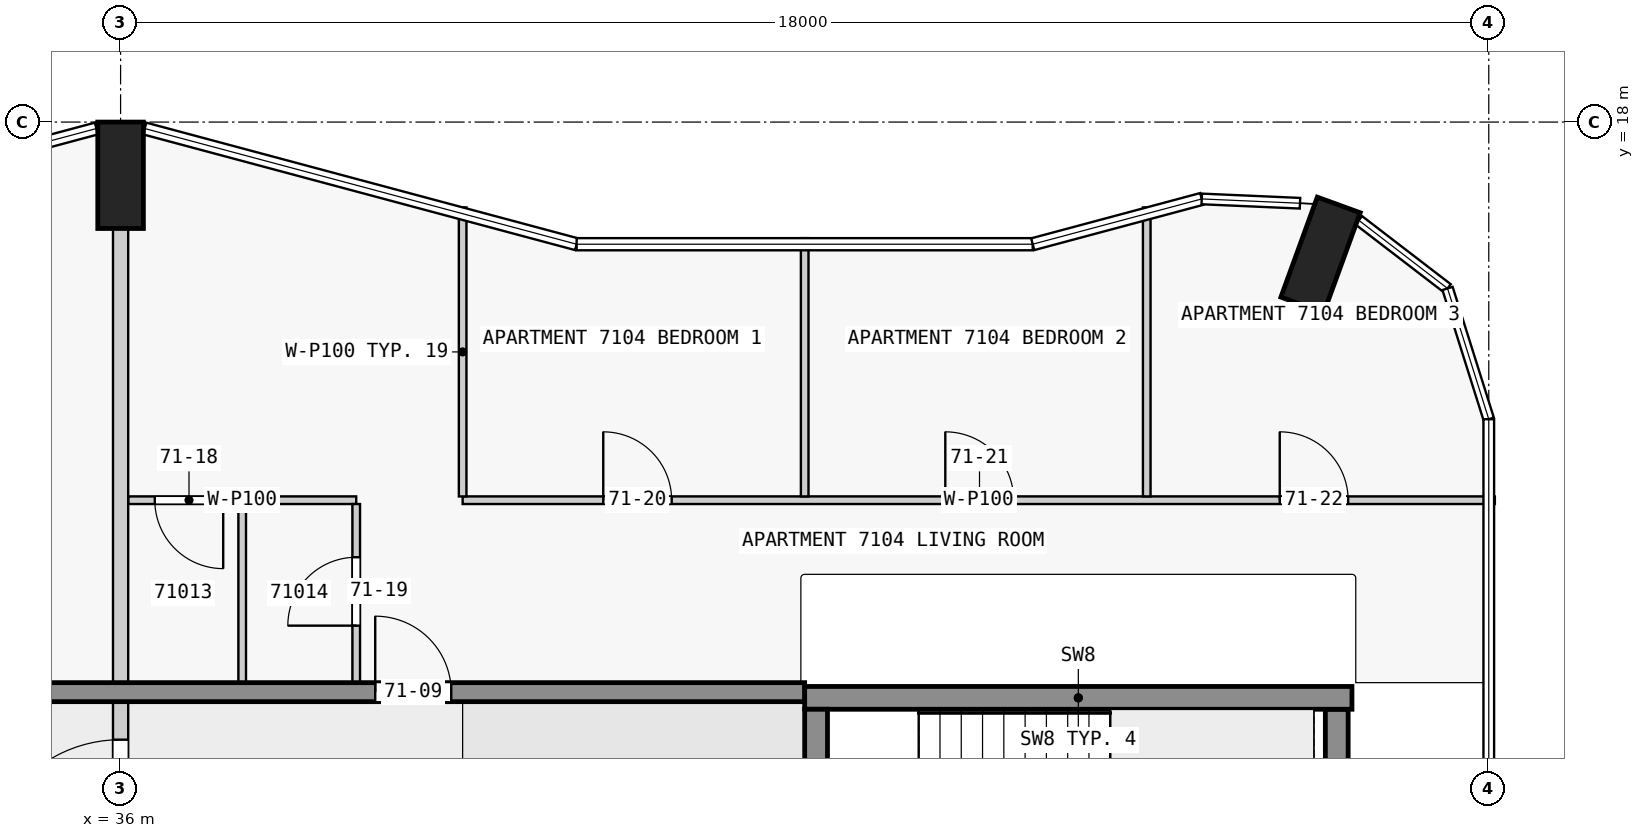
"""IFC4 building model, lengths in metres.
Left out: names, types, materials, properties, quantities, classifications, styles, units other than length and angle.
Written with IfcOpenShell. Run it as: python <this file> out.ifc"""

import sys

from ifc_helpers import new_model, si_unit, direction, frame, frame_2d, origin, origin_2d, place, context, subcontext, project, spatial, rectangle, extrude, element, fill, save


model = new_model("IFC4")
c1 = context("Model", 3, precision=1e-05, world=origin(), true_north=direction((0.0, 1.0)))
c2 = subcontext(c1, "Body", "Model", "MODEL_VIEW")
j1 = project(units=[si_unit("LENGTHUNIT", "METRE"), si_unit("PLANEANGLEUNIT", "RADIAN")], contexts=[c1])
p1 = place(None, origin())
s1 = spatial("IfcSite", under=j1, at=p1, CompositionType="ELEMENT")
p2 = place(p1, origin())
s2 = spatial("IfcBuilding", under=s1, at=p2, CompositionType="ELEMENT")
p3 = place(p2, frame((0.0, 0.0, 270.4)))
s3 = spatial("IfcBuildingStorey", under=s2, at=p3, CompositionType="ELEMENT", Elevation=270.4)
for number, where, z_axis, x_axis in (
    (1, (51.787, 16.252, 0.0), (0.0, 0.0, 1.0), (-0.94, 0.342, 0.0)),
    (2, (36.0, 17.3, 0.0), (0.0, 0.0, 1.0), (1.0, 0.0, 0.0)),
):
    element("IfcColumn", number, at=place(p3, frame(where, z_axis=z_axis, x_axis=x_axis)), inside=s3, PredefinedType="COLUMN", context=c2, shape_type="SweptSolid", body=[
        extrude(rectangle(XDim=0.6, YDim=1.4, at=origin_2d()), origin(), (0.0, 0.0, 1.0), 3.5),
    ])
p4 = place(p3, frame((45.15, 7.725, 0.0), z_axis=(0.0, 0.0, 1.0), x_axis=(0.0, 1.0, 0.0)))
e3 = element("IfcWall", 3, at=p4, inside=s3, PredefinedType="SHEAR", context=c2, shape_type="SweptSolid", body=[
    extrude(rectangle(XDim=2.55, YDim=0.3, at=frame_2d((1.275, 0.0))), origin(), (0.0, 0.0, 1.0), 3.5),
])
p5 = place(p4, frame((0.725, 0.0, 0.0)))
e4 = element("IfcOpeningElement", 4, at=p5, cuts=e3, PredefinedType="OPENING", context=c2, shape_type="SweptSolid", body=[
    extrude(rectangle(XDim=1.1, YDim=2.1, at=frame_2d((0.55, 1.05))), frame((0.0, 0.16, 0.0), z_axis=(0.0, -1.0, 0.0), x_axis=(1.0, 0.0, 0.0)), (0.0, 0.0, 1.0), 0.32),
])
p6 = place(p3, frame((52.0, 7.725, 0.0), z_axis=(0.0, 0.0, 1.0), x_axis=(0.0, 1.0, 0.0)))
e5 = element("IfcWall", 5, at=p6, inside=s3, PredefinedType="SHEAR", context=c2, shape_type="SweptSolid", body=[
    extrude(rectangle(XDim=2.55, YDim=0.3, at=frame_2d((1.275, 0.0))), origin(), (0.0, 0.0, 1.0), 3.5),
])
p7 = place(p3, frame((45.0, 10.425, 0.0), z_axis=(0.0, 0.0, 1.0), x_axis=(1.0, 0.0, 0.0)))
e6 = element("IfcWall", 6, at=p7, inside=s3, PredefinedType="SHEAR", context=c2, shape_type="SweptSolid", body=[
    extrude(rectangle(XDim=7.2, YDim=0.3, at=frame_2d((3.6, 0.0))), origin(), (0.0, 0.0, 1.0), 3.5),
])
p8 = place(p3, frame((22.5, 10.5, 0.0), z_axis=(0.0, 0.0, 1.0), x_axis=(1.0, 0.0, 0.0)))
e7 = element("IfcWall", 7, at=p8, inside=s3, PredefinedType="SHEAR", context=c2, shape_type="SweptSolid", body=[
    extrude(rectangle(XDim=22.5, YDim=0.25, at=frame_2d((11.25, 0.0))), origin(), (0.0, 0.0, 1.0), 3.25),
])
p9 = place(p8, frame((1.75, 0.0, 0.0)))
e8 = element("IfcOpeningElement", 8, at=p9, cuts=e7, PredefinedType="OPENING", context=c2, shape_type="SweptSolid", body=[
    extrude(rectangle(XDim=1.0, YDim=2.1, at=frame_2d((0.5, 1.05))), frame((0.0, 0.135, 0.0), z_axis=(0.0, -1.0, 0.0), x_axis=(1.0, 0.0, 0.0)), (0.0, 0.0, 1.0), 0.27),
])
p10 = place(p8, frame((8.55, 0.0, 0.0)))
e9 = element("IfcOpeningElement", 9, at=p10, cuts=e7, PredefinedType="OPENING", context=c2, shape_type="SweptSolid", body=[
    extrude(rectangle(XDim=1.0, YDim=2.1, at=frame_2d((0.5, 1.05))), frame((0.0, 0.135, 0.0), z_axis=(0.0, -1.0, 0.0), x_axis=(1.0, 0.0, 0.0)), (0.0, 0.0, 1.0), 0.27),
])
p11 = place(p8, frame((16.85, 0.0, 0.0)))
e10 = element("IfcOpeningElement", 10, at=p11, cuts=e7, PredefinedType="OPENING", context=c2, shape_type="SweptSolid", body=[
    extrude(rectangle(XDim=1.0, YDim=2.1, at=frame_2d((0.5, 1.05))), frame((0.0, 0.135, 0.0), z_axis=(0.0, -1.0, 0.0), x_axis=(1.0, 0.0, 0.0)), (0.0, 0.0, 1.0), 0.27),
])
p12 = place(p3, frame((39.1, 13.025, 0.0), z_axis=(0.0, 0.0, 1.0), x_axis=(-1.0, 0.0, 0.0)))
e11 = element("IfcWall", 11, at=p12, inside=s3, PredefinedType="PARTITIONING", context=c2, shape_type="SweptSolid", body=[
    extrude(rectangle(XDim=3.0, YDim=0.1, at=frame_2d((1.5, 0.0))), origin(), (0.0, 0.0, 1.0), 3.25),
])
p13 = place(p12, frame((1.75, 0.0, 0.0)))
e12 = element("IfcOpeningElement", 12, at=p13, cuts=e11, PredefinedType="OPENING", context=c2, shape_type="SweptSolid", body=[
    extrude(rectangle(XDim=0.9, YDim=2.1, at=frame_2d((0.45, 1.05))), frame((0.0, 0.06, 0.0), z_axis=(0.0, -1.0, 0.0), x_axis=(1.0, 0.0, 0.0)), (0.0, 0.0, 1.0), 0.12),
])
p14 = place(p3, frame((40.5, 13.025, 0.0), z_axis=(0.0, 0.0, 1.0), x_axis=(1.0, 0.0, 0.0)))
e13 = element("IfcWall", 13, at=p14, inside=s3, PredefinedType="PARTITIONING", context=c2, shape_type="SweptSolid", body=[
    extrude(rectangle(XDim=13.58, YDim=0.1, at=frame_2d((6.79, 0.0))), origin(), (0.0, 0.0, 1.0), 3.25),
])
p15 = place(p14, frame((1.85, 0.0, 0.0)))
e14 = element("IfcOpeningElement", 14, at=p15, cuts=e13, PredefinedType="OPENING", context=c2, shape_type="SweptSolid", body=[
    extrude(rectangle(XDim=0.9, YDim=2.1, at=frame_2d((0.45, 1.05))), frame((0.0, 0.06, 0.0), z_axis=(0.0, -1.0, 0.0), x_axis=(1.0, 0.0, 0.0)), (0.0, 0.0, 1.0), 0.12),
])
p16 = place(p14, frame((6.35, 0.0, 0.0)))
e15 = element("IfcOpeningElement", 15, at=p16, cuts=e13, PredefinedType="OPENING", context=c2, shape_type="SweptSolid", body=[
    extrude(rectangle(XDim=0.9, YDim=2.1, at=frame_2d((0.45, 1.05))), frame((0.0, 0.06, 0.0), z_axis=(0.0, -1.0, 0.0), x_axis=(1.0, 0.0, 0.0)), (0.0, 0.0, 1.0), 0.12),
])
p17 = place(p14, frame((10.75, 0.0, 0.0)))
e16 = element("IfcOpeningElement", 16, at=p17, cuts=e13, PredefinedType="OPENING", context=c2, shape_type="SweptSolid", body=[
    extrude(rectangle(XDim=0.9, YDim=2.1, at=frame_2d((0.45, 1.05))), frame((0.0, 0.06, 0.0), z_axis=(0.0, -1.0, 0.0), x_axis=(1.0, 0.0, 0.0)), (0.0, 0.0, 1.0), 0.12),
])
p18 = place(p3, frame((36.0, 10.625, 0.0), z_axis=(0.0, 0.0, 1.0), x_axis=(0.0, 1.0, 0.0)))
e17 = element("IfcWall", 17, at=p18, inside=s3, PredefinedType="PARTITIONING", context=c2, shape_type="SweptSolid", body=[
    extrude(rectangle(XDim=5.975, YDim=0.2, at=frame_2d((2.988, 0.0))), origin(), (0.0, 0.0, 1.0), 3.25),
])
p19 = place(p3, frame((37.6, 10.625, 0.0), z_axis=(0.0, 0.0, 1.0), x_axis=(0.0, 1.0, 0.0)))
e18 = element("IfcWall", 18, at=p19, inside=s3, PredefinedType="PARTITIONING", context=c2, shape_type="SweptSolid", body=[
    extrude(rectangle(XDim=2.35, YDim=0.1, at=frame_2d((1.175, 0.0))), origin(), (0.0, 0.0, 1.0), 3.25),
])
p20 = place(p3, frame((39.1, 10.625, 0.0), z_axis=(0.0, 0.0, 1.0), x_axis=(0.0, 1.0, 0.0)))
e19 = element("IfcWall", 19, at=p20, inside=s3, PredefinedType="PARTITIONING", context=c2, shape_type="SweptSolid", body=[
    extrude(rectangle(XDim=2.35, YDim=0.1, at=frame_2d((1.175, 0.0))), origin(), (0.0, 0.0, 1.0), 3.25),
])
p21 = place(p20, frame((0.75, 0.0, 0.0)))
e20 = element("IfcOpeningElement", 20, at=p21, cuts=e19, PredefinedType="OPENING", context=c2, shape_type="SweptSolid", body=[
    extrude(rectangle(XDim=0.9, YDim=2.1, at=frame_2d((0.45, 1.05))), frame((0.0, 0.06, 0.0), z_axis=(0.0, -1.0, 0.0), x_axis=(1.0, 0.0, 0.0)), (0.0, 0.0, 1.0), 0.12),
])
p22 = place(p3, frame((40.5, 16.878, 0.0), z_axis=(0.0, 0.0, 1.0), x_axis=(0.0, -1.0, 0.0)))
e21 = element("IfcWall", 21, at=p22, inside=s3, PredefinedType="PARTITIONING", context=c2, shape_type="SweptSolid", body=[
    extrude(rectangle(XDim=3.803, YDim=0.1, at=frame_2d((1.901, 0.0))), origin(), (0.0, 0.0, 1.0), 3.25),
])
p23 = place(p3, frame((45.0, 13.075, 0.0), z_axis=(0.0, 0.0, 1.0), x_axis=(0.0, 1.0, 0.0)))
e22 = element("IfcWall", 22, at=p23, inside=s3, PredefinedType="PARTITIONING", context=c2, shape_type="SweptSolid", body=[
    extrude(rectangle(XDim=3.398, YDim=0.1, at=frame_2d((1.699, 0.0))), origin(), (0.0, 0.0, 1.0), 3.25),
])
p24 = place(p3, frame((49.5, 13.075, 0.0), z_axis=(0.0, 0.0, 1.0), x_axis=(0.0, 1.0, 0.0)))
e23 = element("IfcWall", 23, at=p24, inside=s3, PredefinedType="PARTITIONING", context=c2, shape_type="SweptSolid", body=[
    extrude(rectangle(XDim=3.803, YDim=0.1, at=frame_2d((1.901, 0.0))), origin(), (0.0, 0.0, 1.0), 3.25),
])
p25 = place(p3, frame((36.0, 7.475, 0.0), z_axis=(0.0, 0.0, 1.0), x_axis=(0.0, 1.0, 0.0)))
e24 = element("IfcWall", 24, at=p25, inside=s3, PredefinedType="PARTITIONING", context=c2, shape_type="SweptSolid", body=[
    extrude(rectangle(XDim=3.05, YDim=0.2, at=frame_2d((1.525, 0.0))), origin(), (0.0, 0.0, 1.0), 3.25),
])
p26 = place(p25, frame((0.6, 0.0, 0.0)))
e25 = element("IfcOpeningElement", 25, at=p26, cuts=e24, PredefinedType="OPENING", context=c2, shape_type="SweptSolid", body=[
    extrude(rectangle(XDim=1.8, YDim=2.1, at=frame_2d((0.9, 1.05))), frame((0.0, 0.11, 0.0), z_axis=(0.0, -1.0, 0.0), x_axis=(1.0, 0.0, 0.0)), (0.0, 0.0, 1.0), 0.22),
])
p27 = place(p11, origin())
e26 = element("IfcDoor", 26, at=p27, inside=s3, OperationType="SINGLE_SWING_RIGHT", PredefinedType="DOOR", context=c2, shape_type="SweptSolid", body=[
    extrude(rectangle(XDim=1.0, YDim=2.1, at=frame_2d((0.5, 1.05))), frame((0.0, 0.025, 0.0), z_axis=(0.0, -1.0, 0.0), x_axis=(1.0, 0.0, 0.0)), (0.0, 0.0, 1.0), 0.05),
])
fill(e10, e26)
p28 = place(p26, origin())
e27 = element("IfcDoor", 27, at=p28, inside=s3, OperationType="SINGLE_SWING_LEFT", PredefinedType="DOOR", context=c2, shape_type="SweptSolid", body=[
    extrude(rectangle(XDim=1.8, YDim=2.1, at=frame_2d((0.9, 1.05))), frame((0.0, 0.025, 0.0), z_axis=(0.0, -1.0, 0.0), x_axis=(1.0, 0.0, 0.0)), (0.0, 0.0, 1.0), 0.05),
])
fill(e25, e27)
p29 = place(p13, origin())
e28 = element("IfcDoor", 28, at=p29, inside=s3, OperationType="SINGLE_SWING_RIGHT", PredefinedType="DOOR", context=c2, shape_type="SweptSolid", body=[
    extrude(rectangle(XDim=0.9, YDim=2.1, at=frame_2d((0.45, 1.05))), frame((0.0, 0.025, 0.0), z_axis=(0.0, -1.0, 0.0), x_axis=(1.0, 0.0, 0.0)), (0.0, 0.0, 1.0), 0.05),
])
fill(e12, e28)
p30 = place(p21, origin())
e29 = element("IfcDoor", 29, at=p30, inside=s3, OperationType="SINGLE_SWING_RIGHT", PredefinedType="DOOR", context=c2, shape_type="SweptSolid", body=[
    extrude(rectangle(XDim=0.9, YDim=2.1, at=frame_2d((0.45, 1.05))), frame((0.0, 0.025, 0.0), z_axis=(0.0, -1.0, 0.0), x_axis=(1.0, 0.0, 0.0)), (0.0, 0.0, 1.0), 0.05),
])
fill(e20, e29)
p31 = place(p15, origin())
e30 = element("IfcDoor", 30, at=p31, inside=s3, OperationType="SINGLE_SWING_LEFT", PredefinedType="DOOR", context=c2, shape_type="SweptSolid", body=[
    extrude(rectangle(XDim=0.9, YDim=2.1, at=frame_2d((0.45, 1.05))), frame((0.0, 0.025, 0.0), z_axis=(0.0, -1.0, 0.0), x_axis=(1.0, 0.0, 0.0)), (0.0, 0.0, 1.0), 0.05),
])
fill(e14, e30)
p32 = place(p16, origin())
e31 = element("IfcDoor", 31, at=p32, inside=s3, OperationType="SINGLE_SWING_RIGHT", PredefinedType="DOOR", context=c2, shape_type="SweptSolid", body=[
    extrude(rectangle(XDim=0.9, YDim=2.1, at=frame_2d((0.45, 1.05))), frame((0.0, 0.025, 0.0), z_axis=(0.0, -1.0, 0.0), x_axis=(1.0, 0.0, 0.0)), (0.0, 0.0, 1.0), 0.05),
])
fill(e15, e31)
p33 = place(p17, origin())
e32 = element("IfcDoor", 32, at=p33, inside=s3, OperationType="SINGLE_SWING_RIGHT", PredefinedType="DOOR", context=c2, shape_type="SweptSolid", body=[
    extrude(rectangle(XDim=0.9, YDim=2.1, at=frame_2d((0.45, 1.05))), frame((0.0, 0.025, 0.0), z_axis=(0.0, -1.0, 0.0), x_axis=(1.0, 0.0, 0.0)), (0.0, 0.0, 1.0), 0.05),
])
fill(e16, e32)
save(model, sys.argv[1])
